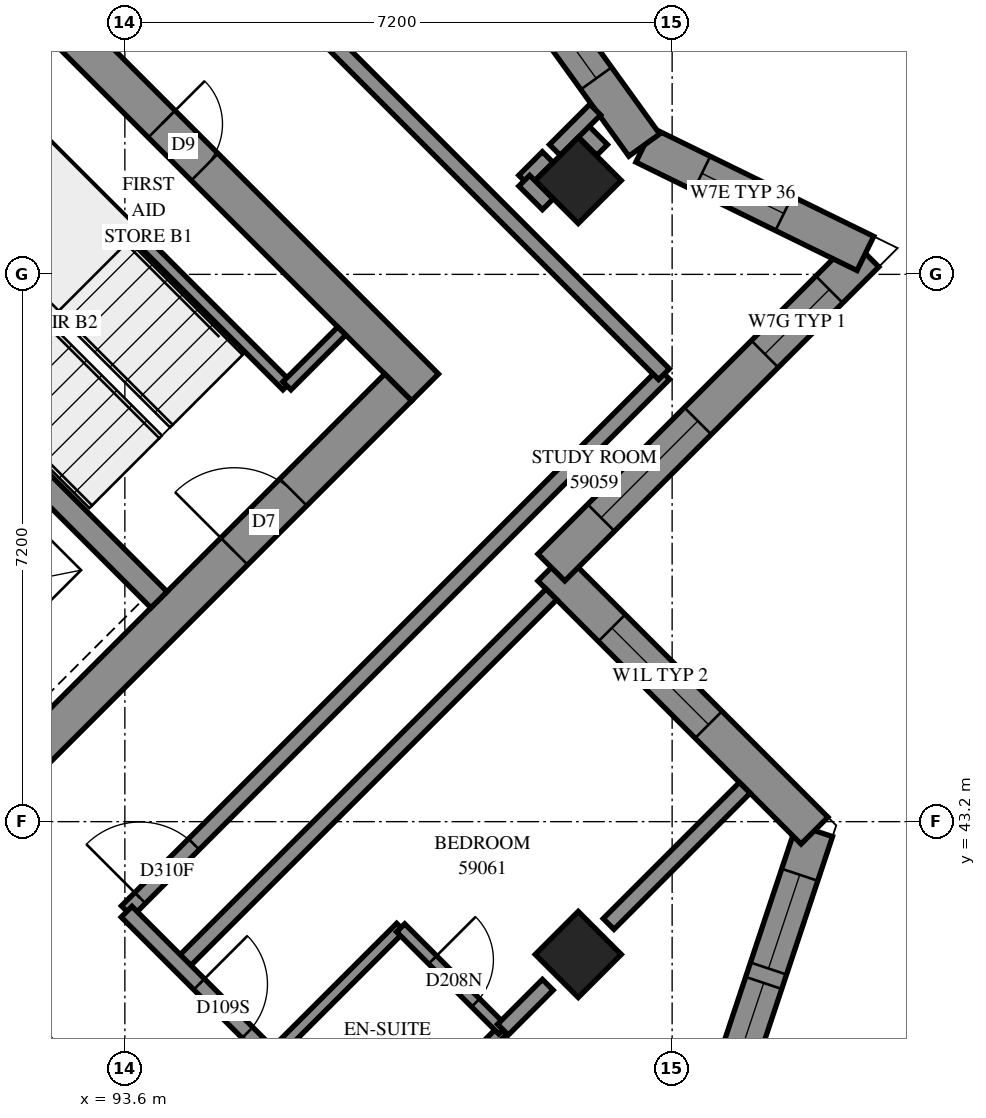
"""IFC4 building model, lengths in metres.
Left out: names, types, materials, properties, quantities, classifications, styles, units other than length and angle.
Written with IfcOpenShell. Run it as: python <this file> out.ifc"""

import sys

from ifc_helpers import new_model, si_unit, direction, frame, frame_2d, origin, origin_2d, place, context, subcontext, project, spatial, polyline, rectangle, outline, extrude, element, fill, save


model = new_model("IFC4")
c1 = context("Model", 3, precision=1e-05, world=origin(), true_north=direction((0.0, 1.0)))
c2 = subcontext(c1, "Body", "Model", "MODEL_VIEW")
j1 = project(units=[si_unit("LENGTHUNIT", "METRE"), si_unit("PLANEANGLEUNIT", "RADIAN")], contexts=[c1])
p1 = place(None, origin())
s1 = spatial("IfcSite", under=j1, at=p1, CompositionType="ELEMENT")
p2 = place(p1, origin())
s2 = spatial("IfcBuilding", under=s1, at=p2, CompositionType="ELEMENT")
p3 = place(p2, frame((0.0, 0.0, 216.8)))
s3 = spatial("IfcBuildingStorey", under=s2, at=p3, CompositionType="ELEMENT", Elevation=216.8)
for number, where, z_axis, x_axis in (
    (1, (99.565, 51.635, 0.0), (0.0, 0.0, 1.0), (0.707, -0.707, 0.0)),
    (2, (99.565, 41.453, 0.0), (0.0, 0.0, 1.0), (0.707, -0.707, 0.0)),
):
    element("IfcColumn", number, at=place(p3, frame(where, z_axis=z_axis, x_axis=x_axis)), inside=s3, PredefinedType="COLUMN", context=c2, shape_type="SweptSolid", body=[
        extrude(rectangle(XDim=0.8, YDim=0.8, at=origin_2d()), origin(), (0.0, 0.0, 1.0), 3.1),
    ])
p4 = place(p3, frame((86.66, 59.802, -0.3), z_axis=(0.0, 0.0, 1.0), x_axis=(0.7071067812, -0.7071067812, 0.0)))
e3 = element("IfcWall", 3, at=p4, inside=s3, PredefinedType="SHEAR", context=c2, shape_type="SweptSolid", body=[
    extrude(rectangle(XDim=15.4, YDim=0.5, at=frame_2d((7.7, 0.0))), origin(), (0.0, 0.0, 1.0), 2.7),
])
p5 = place(p4, frame((10.5, 0.0, 0.3)))
e4 = element("IfcOpeningElement", 4, at=p5, cuts=e3, PredefinedType="OPENING", context=c2, shape_type="SweptSolid", body=[
    extrude(rectangle(XDim=0.8, YDim=2.1, at=frame_2d((0.4, 1.05))), frame((0.0, 0.26, 0.0), z_axis=(0.0, -1.0, 0.0), x_axis=(1.0, 0.0, 0.0)), (0.0, 0.0, 1.0), 0.52),
])
p6 = place(p3, frame((87.013, 38.731, -0.3), z_axis=(0.0, 0.0, 1.0), x_axis=(0.7071067812, 0.7071067812, 0.0)))
e5 = element("IfcWall", 5, at=p6, inside=s3, PredefinedType="SHEAR", context=c2, shape_type="SweptSolid", body=[
    extrude(rectangle(XDim=14.4, YDim=0.5, at=frame_2d((7.2, 0.0))), origin(), (0.0, 0.0, 1.0), 2.7),
])
p7 = place(p6, frame((4.55, 0.0, 0.3)))
e6 = element("IfcOpeningElement", 6, at=p7, cuts=e5, PredefinedType="OPENING", context=c2, shape_type="SweptSolid", body=[
    extrude(rectangle(XDim=1.1, YDim=2.1, at=frame_2d((0.55, 1.05))), frame((0.0, 0.26, 0.0), z_axis=(0.0, -1.0, 0.0), x_axis=(1.0, 0.0, 0.0)), (0.0, 0.0, 1.0), 0.52),
])
p8 = place(p6, frame((11.35, 0.0, 0.3)))
e7 = element("IfcOpeningElement", 7, at=p8, cuts=e5, PredefinedType="OPENING", context=c2, shape_type="SweptSolid", body=[
    extrude(rectangle(XDim=1.1, YDim=2.1, at=frame_2d((0.55, 1.05))), frame((0.0, 0.26, 0.0), z_axis=(0.0, -1.0, 0.0), x_axis=(1.0, 0.0, 0.0)), (0.0, 0.0, 1.0), 0.52),
])
p9 = place(p3, frame((88.958, 51.211, 0.0), z_axis=(0.0, 0.0, 1.0), x_axis=(0.7070998367, -0.7071137256, 0.0)))
e8 = element("IfcWall", 8, at=p9, inside=s3, PredefinedType="SOLIDWALL", context=c2, shape_type="SweptSolid", body=[
    extrude(rectangle(XDim=7.2, YDim=0.3, at=frame_2d((3.6, 0.0))), origin(), (0.0, 0.0, 1.0), 3.1),
])
p10 = place(p3, frame((101.062, 38.252, 0.0), z_axis=(0.0, 0.0, 1.0), x_axis=(0.3162395484, 0.9486793705, 0.0)))
e9 = element("IfcWall", 9, at=p10, inside=s3, PredefinedType="SOLIDWALL", context=c2, shape_type="SweptSolid", body=[
    extrude(outline(polyline([(-0.12, -0.25), (5.247, -0.25), (4.938, 0.25), (0.12, 0.25), (-0.12, -0.25)])), origin(), (0.0, 0.0, 1.0), 3.1),
])
p11 = place(p10, frame((1.68, 0.0, 0.45)))
e10 = element("IfcOpeningElement", 10, at=p11, cuts=e9, PredefinedType="OPENING", context=c2, shape_type="SweptSolid", body=[
    extrude(rectangle(XDim=1.3, YDim=2.5, at=frame_2d((0.65, 1.25))), frame((0.0, 0.26, 0.0), z_axis=(0.0, -1.0, 0.0), x_axis=(1.0, 0.0, 0.0)), (0.0, 0.0, 1.0), 0.52),
])
p12 = place(p10, frame((3.18, 0.0, 0.45)))
e11 = element("IfcOpeningElement", 11, at=p12, cuts=e9, PredefinedType="OPENING", context=c2, shape_type="SweptSolid", body=[
    extrude(rectangle(XDim=1.3, YDim=2.5, at=frame_2d((0.65, 1.25))), frame((0.0, 0.26, 0.0), z_axis=(0.0, -1.0, 0.0), x_axis=(1.0, 0.0, 0.0)), (0.0, 0.0, 1.0), 0.52),
])
p13 = place(p3, frame((102.673, 43.083, 0.0), z_axis=(0.0, 0.0, 1.0), x_axis=(-0.7071067812, 0.7071067812, 0.0)))
e12 = element("IfcWall", 12, at=p13, inside=s3, PredefinedType="SOLIDWALL", context=c2, shape_type="SweptSolid", body=[
    extrude(outline(polyline([(-0.154, -0.25), (4.646, -0.25), (5.146, 0.25), (0.154, 0.25), (-0.154, -0.25)])), origin(), (0.0, 0.0, 1.0), 3.1),
])
p14 = place(p13, frame((1.97, 0.0, 0.6)))
e13 = element("IfcOpeningElement", 13, at=p14, cuts=e12, PredefinedType="OPENING", context=c2, shape_type="SweptSolid", body=[
    extrude(rectangle(XDim=1.8, YDim=1.9, at=frame_2d((0.9, 0.95))), frame((0.0, 0.26, 0.0), z_axis=(0.0, -1.0, 0.0), x_axis=(1.0, 0.0, 0.0)), (0.0, 0.0, 1.0), 0.52),
])
p15 = place(p3, frame((99.211, 46.544, 0.0), z_axis=(0.0, 0.0, 1.0), x_axis=(0.7071067812, 0.7071067812, 0.0)))
e14 = element("IfcWall", 14, at=p15, inside=s3, PredefinedType="SOLIDWALL", context=c2, shape_type="SweptSolid", body=[
    extrude(outline(polyline([(0.25, -0.25), (6.192, -0.25), (5.492, 0.25), (-0.25, 0.25), (0.25, -0.25)])), origin(), (0.0, 0.0, 1.0), 3.1),
])
p16 = place(p15, frame((0.925, 0.0, 0.6)))
e15 = element("IfcOpeningElement", 15, at=p16, cuts=e14, PredefinedType="OPENING", context=c2, shape_type="SweptSolid", body=[
    extrude(rectangle(XDim=1.8, YDim=1.9, at=frame_2d((0.9, 0.95))), frame((0.0, 0.26, 0.0), z_axis=(0.0, -1.0, 0.0), x_axis=(1.0, 0.0, 0.0)), (0.0, 0.0, 1.0), 0.52),
])
p17 = place(p15, frame((3.971, 0.0, 0.6)))
e16 = element("IfcOpeningElement", 16, at=p17, cuts=e14, PredefinedType="OPENING", context=c2, shape_type="SweptSolid", body=[
    extrude(rectangle(XDim=1.2, YDim=1.9, at=frame_2d((0.6, 0.95))), frame((0.0, 0.26, 0.0), z_axis=(0.0, -1.0, 0.0), x_axis=(1.0, 0.0, 0.0)), (0.0, 0.0, 1.0), 0.52),
])
p18 = place(p3, frame((103.342, 50.675, 0.0), z_axis=(0.0, 0.0, 1.0), x_axis=(-0.8979728607, 0.4400508396, 0.0)))
e17 = element("IfcWall", 17, at=p18, inside=s3, PredefinedType="SOLIDWALL", context=c2, shape_type="SweptSolid", body=[
    extrude(outline(polyline([(-0.35, -0.25), (3.177, -0.25), (3.302, 0.25), (0.35, 0.25), (-0.35, -0.25)])), origin(), (0.0, 0.0, 1.0), 3.1),
])
p19 = place(p18, frame((1.195, 0.0, 0.45)))
e18 = element("IfcOpeningElement", 18, at=p19, cuts=e17, PredefinedType="OPENING", context=c2, shape_type="SweptSolid", body=[
    extrude(rectangle(XDim=1.2, YDim=2.5, at=frame_2d((0.6, 1.25))), frame((0.0, 0.26, 0.0), z_axis=(0.0, -1.0, 0.0), x_axis=(1.0, 0.0, 0.0)), (0.0, 0.0, 1.0), 0.52),
])
p20 = place(p3, frame((100.433, 52.101, 0.0), z_axis=(0.0, 0.0, 1.0), x_axis=(-0.5845942373, 0.8113258148, 0.0)))
e19 = element("IfcWall", 19, at=p20, inside=s3, PredefinedType="SOLIDWALL", context=c2, shape_type="SweptSolid", body=[
    extrude(outline(polyline([(0.063, -0.25), (3.443, -0.25), (3.362, 0.25), (-0.063, 0.25), (0.063, -0.25)])), origin(), (0.0, 0.0, 1.0), 3.1),
])
p21 = place(p20, frame((1.081, 0.0, 0.45)))
e20 = element("IfcOpeningElement", 20, at=p21, cuts=e19, PredefinedType="OPENING", context=c2, shape_type="SweptSolid", body=[
    extrude(rectangle(XDim=1.2, YDim=2.5, at=frame_2d((0.6, 1.25))), frame((0.0, 0.26, 0.0), z_axis=(0.0, -1.0, 0.0), x_axis=(1.0, 0.0, 0.0)), (0.0, 0.0, 1.0), 0.52),
])
p22 = place(p3, frame((91.313, 53.354, 0.0), z_axis=(0.0, 0.0, 1.0), x_axis=(0.7071147811, -0.7070987812, 0.0)))
e21 = element("IfcWall", 21, at=p22, inside=s3, PredefinedType="PARTITIONING", context=c2, shape_type="SweptSolid", body=[
    extrude(rectangle(XDim=6.25, YDim=0.15, at=frame_2d((3.125, 0.0))), origin(), (0.0, 0.0, 1.0), 3.1),
])
p23 = place(p3, frame((95.732, 48.934, 0.0), z_axis=(0.0, 0.0, 1.0), x_axis=(0.7071067812, 0.7071067812, 0.0)))
e22 = element("IfcWall", 22, at=p23, inside=s3, PredefinedType="PARTITIONING", context=c2, shape_type="SweptSolid", body=[
    extrude(rectangle(XDim=1.02, YDim=0.15, at=frame_2d((0.51, 0.0))), origin(), (0.0, 0.0, 1.0), 3.1),
])
p24 = place(p3, frame((93.625, 42.021, 0.0), z_axis=(0.0, 0.0, 1.0), x_axis=(0.7071067812, 0.7071067812, 0.0)))
e23 = element("IfcWall", 23, at=p24, inside=s3, PredefinedType="PARTITIONING", context=c2, shape_type="SweptSolid", body=[
    extrude(rectangle(XDim=9.998, YDim=0.2, at=frame_2d((4.999, 0.0))), origin(), (0.0, 0.0, 1.0), 3.1),
])
p25 = place(p24, frame((0.248, 0.0, 0.0)))
e24 = element("IfcOpeningElement", 24, at=p25, cuts=e23, PredefinedType="OPENING", context=c2, shape_type="SweptSolid", body=[
    extrude(rectangle(XDim=1.0, YDim=2.1, at=frame_2d((0.5, 1.05))), frame((0.0, 0.11, 0.0), z_axis=(0.0, -1.0, 0.0), x_axis=(1.0, 0.0, 0.0)), (0.0, 0.0, 1.0), 0.22),
])
p26 = place(p3, frame((94.331, 41.313, 0.0), z_axis=(0.0, 0.0, 1.0), x_axis=(0.7072516979, 0.7069618347, 0.0)))
e25 = element("IfcWall", 25, at=p26, inside=s3, PredefinedType="PARTITIONING", context=c2, shape_type="SweptSolid", body=[
    extrude(rectangle(XDim=6.9, YDim=0.2, at=frame_2d((3.45, 0.0))), origin(), (0.0, 0.0, 1.0), 3.1),
])
p27 = place(p3, frame((96.309, 53.471, 0.0), z_axis=(0.0, 0.0, 1.0), x_axis=(0.7071067812, -0.7071067812, 0.0)))
e26 = element("IfcWall", 26, at=p27, inside=s3, PredefinedType="PARTITIONING", context=c2, shape_type="SweptSolid", body=[
    extrude(rectangle(XDim=6.2, YDim=0.2, at=frame_2d((3.1, 0.0))), origin(), (0.0, 0.0, 1.0), 3.1),
])
p28 = place(p3, frame((93.623, 42.015, 0.0), z_axis=(0.0, 0.0, 1.0), x_axis=(0.7071067812, -0.7071067812, 0.0)))
e27 = element("IfcWall", 27, at=p28, inside=s3, PredefinedType="PARTITIONING", context=c2, shape_type="SweptSolid", body=[
    extrude(rectangle(XDim=4.599, YDim=0.2, at=frame_2d((2.3, 0.0))), origin(), (0.0, 0.0, 1.0), 3.1),
])
p29 = place(p28, frame((1.349, 0.0, 0.0)))
e28 = element("IfcOpeningElement", 28, at=p29, cuts=e27, PredefinedType="OPENING", context=c2, shape_type="SweptSolid", body=[
    extrude(rectangle(XDim=0.9, YDim=2.1, at=frame_2d((0.45, 1.05))), frame((0.0, 0.11, 0.0), z_axis=(0.0, -1.0, 0.0), x_axis=(1.0, 0.0, 0.0)), (0.0, 0.0, 1.0), 0.22),
])
p30 = place(p3, frame((92.216, 40.608, 0.0), z_axis=(0.0, 0.0, 1.0), x_axis=(0.7071067812, -0.7071067812, 0.0)))
e29 = element("IfcWall", 29, at=p30, inside=s3, PredefinedType="PARTITIONING", context=c2, shape_type="SweptSolid", body=[
    extrude(rectangle(XDim=4.599, YDim=0.2, at=frame_2d((2.3, 0.0))), origin(), (0.0, 0.0, 1.0), 3.1),
])
p31 = place(p30, frame((3.189, 0.0, 0.0)))
e30 = element("IfcOpeningElement", 30, at=p31, cuts=e29, PredefinedType="OPENING", context=c2, shape_type="SweptSolid", body=[
    extrude(rectangle(XDim=0.9, YDim=2.1, at=frame_2d((0.45, 1.05))), frame((0.0, 0.11, 0.0), z_axis=(0.0, -1.0, 0.0), x_axis=(1.0, 0.0, 0.0)), (0.0, 0.0, 1.0), 0.22),
])
p32 = place(p3, frame((99.964, 41.854, 0.0), z_axis=(0.0, 0.0, 1.0), x_axis=(0.7071265121, 0.7070870497, 0.0)))
e31 = element("IfcWall", 31, at=p32, inside=s3, PredefinedType="PARTITIONING", context=c2, shape_type="SweptSolid", body=[
    extrude(rectangle(XDim=2.534, YDim=0.2, at=frame_2d((1.267, 0.0))), origin(), (0.0, 0.0, 1.0), 3.1),
])
p33 = place(p3, frame((96.879, 38.764, 0.0), z_axis=(0.0, 0.0, 1.0), x_axis=(0.706689978, 0.7075233388, 0.0)))
e32 = element("IfcWall", 32, at=p33, inside=s3, PredefinedType="PARTITIONING", context=c2, shape_type="SweptSolid", body=[
    extrude(rectangle(XDim=2.4, YDim=0.15, at=frame_2d((1.2, 0.0))), origin(), (0.0, 0.0, 1.0), 2.6),
])
p34 = place(p3, frame((95.531, 40.113, 0.0), z_axis=(0.0, 0.0, 1.0), x_axis=(0.7075233388, 0.706689978, 0.0)))
e33 = element("IfcWall", 33, at=p34, inside=s3, PredefinedType="PARTITIONING", context=c2, shape_type="SweptSolid", body=[
    extrude(rectangle(XDim=2.4, YDim=0.15, at=frame_2d((1.2, 0.0))), origin(), (0.0, 0.0, 1.0), 3.1),
])
p35 = place(p3, frame((97.229, 41.803, 0.0), z_axis=(0.0, 0.0, 1.0), x_axis=(0.7071067812, -0.7071067812, 0.0)))
e34 = element("IfcWall", 34, at=p35, inside=s3, PredefinedType="PARTITIONING", context=c2, shape_type="SweptSolid", body=[
    extrude(rectangle(XDim=1.898, YDim=0.15, at=frame_2d((0.949, 0.0))), origin(), (0.0, 0.0, 1.0), 3.1),
])
p36 = place(p35, frame((0.594, 0.0, 0.0)))
e35 = element("IfcOpeningElement", 35, at=p36, cuts=e34, PredefinedType="OPENING", context=c2, shape_type="SweptSolid", body=[
    extrude(rectangle(XDim=0.8, YDim=2.1, at=frame_2d((0.4, 1.05))), frame((0.0, 0.085, 0.0), z_axis=(0.0, -1.0, 0.0), x_axis=(1.0, 0.0, 0.0)), (0.0, 0.0, 1.0), 0.17),
])
p37 = place(p3, frame((98.574, 40.464, 0.0), z_axis=(0.0, 0.0, 1.0), x_axis=(0.7071067812, 0.7071067812, 0.0)))
e36 = element("IfcWall", 36, at=p37, inside=s3, PredefinedType="PARTITIONING", context=c2, shape_type="SweptSolid", body=[
    extrude(rectangle(XDim=0.834, YDim=0.2, at=frame_2d((0.417, 0.0))), origin(), (0.0, 0.0, 1.0), 2.6),
])
for number, where, z_axis, x_axis in (
    (37, (98.853, 51.633, 0.0), (0.0, 0.0, 1.0), (0.707, 0.707, 0.0)),
    (38, (98.854, 51.632, 0.0), (0.0, 0.0, 1.0), (0.707, -0.707, 0.0)),
    (39, (99.568, 52.346, 0.0), (0.0, 0.0, 1.0), (0.707, -0.707, 0.0)),
):
    element("IfcWall", number, at=place(p3, frame(where, z_axis=z_axis, x_axis=x_axis)), inside=s3, PredefinedType="PARTITIONING", context=c2, shape_type="SweptSolid", body=[
        extrude(rectangle(XDim=0.438, YDim=0.2, at=frame_2d((0.219, 0.0))), origin(), (0.0, 0.0, 1.0), 3.1),
    ])
p38 = place(p3, frame((99.257, 52.037, 0.0), z_axis=(0.0, 0.0, 1.0), x_axis=(0.7071067812, 0.7071067812, 0.0)))
e40 = element("IfcWall", 40, at=p38, inside=s3, PredefinedType="PARTITIONING", context=c2, shape_type="SweptSolid", body=[
    extrude(rectangle(XDim=0.751, YDim=0.2, at=frame_2d((0.376, 0.0))), origin(), (0.0, 0.0, 1.0), 3.1),
])
p39 = place(p11, origin())
e41 = element("IfcWindow", 41, at=p39, inside=s3, PartitioningType="SINGLE_PANEL", PredefinedType="WINDOW", context=c2, shape_type="SweptSolid", body=[
    extrude(rectangle(XDim=1.3, YDim=2.5, at=frame_2d((0.65, 1.25))), frame((0.0, 0.18, 0.0), z_axis=(0.0, -1.0, 0.0), x_axis=(1.0, 0.0, 0.0)), (0.0, 0.0, 1.0), 0.06),
])
fill(e10, e41)
p40 = place(p12, origin())
e42 = element("IfcWindow", 42, at=p40, inside=s3, PartitioningType="SINGLE_PANEL", PredefinedType="WINDOW", context=c2, shape_type="SweptSolid", body=[
    extrude(rectangle(XDim=1.3, YDim=2.5, at=frame_2d((0.65, 1.25))), frame((0.0, 0.18, 0.0), z_axis=(0.0, -1.0, 0.0), x_axis=(1.0, 0.0, 0.0)), (0.0, 0.0, 1.0), 0.06),
])
fill(e11, e42)
p41 = place(p14, origin())
e43 = element("IfcWindow", 43, at=p41, inside=s3, PartitioningType="SINGLE_PANEL", PredefinedType="WINDOW", context=c2, shape_type="SweptSolid", body=[
    extrude(rectangle(XDim=1.8, YDim=1.9, at=frame_2d((0.9, 0.95))), frame((0.0, 0.18, 0.0), z_axis=(0.0, -1.0, 0.0), x_axis=(1.0, 0.0, 0.0)), (0.0, 0.0, 1.0), 0.06),
])
fill(e13, e43)
p42 = place(p16, origin())
e44 = element("IfcWindow", 44, at=p42, inside=s3, PartitioningType="SINGLE_PANEL", PredefinedType="WINDOW", context=c2, shape_type="SweptSolid", body=[
    extrude(rectangle(XDim=1.8, YDim=1.9, at=frame_2d((0.9, 0.95))), frame((0.0, 0.18, 0.0), z_axis=(0.0, -1.0, 0.0), x_axis=(1.0, 0.0, 0.0)), (0.0, 0.0, 1.0), 0.06),
])
fill(e15, e44)
p43 = place(p17, origin())
e45 = element("IfcWindow", 45, at=p43, inside=s3, PartitioningType="SINGLE_PANEL", PredefinedType="WINDOW", context=c2, shape_type="SweptSolid", body=[
    extrude(rectangle(XDim=1.2, YDim=1.9, at=frame_2d((0.6, 0.95))), frame((0.0, 0.18, 0.0), z_axis=(0.0, -1.0, 0.0), x_axis=(1.0, 0.0, 0.0)), (0.0, 0.0, 1.0), 0.06),
])
fill(e16, e45)
p44 = place(p19, origin())
e46 = element("IfcWindow", 46, at=p44, inside=s3, PartitioningType="SINGLE_PANEL", PredefinedType="WINDOW", context=c2, shape_type="SweptSolid", body=[
    extrude(rectangle(XDim=1.2, YDim=2.5, at=frame_2d((0.6, 1.25))), frame((0.0, 0.18, 0.0), z_axis=(0.0, -1.0, 0.0), x_axis=(1.0, 0.0, 0.0)), (0.0, 0.0, 1.0), 0.06),
])
fill(e18, e46)
p45 = place(p21, origin())
e47 = element("IfcWindow", 47, at=p45, inside=s3, PartitioningType="SINGLE_PANEL", PredefinedType="WINDOW", context=c2, shape_type="SweptSolid", body=[
    extrude(rectangle(XDim=1.2, YDim=2.5, at=frame_2d((0.6, 1.25))), frame((0.0, 0.18, 0.0), z_axis=(0.0, -1.0, 0.0), x_axis=(1.0, 0.0, 0.0)), (0.0, 0.0, 1.0), 0.06),
])
fill(e20, e47)
p46 = place(p5, origin())
e48 = element("IfcDoor", 48, at=p46, inside=s3, OperationType="SINGLE_SWING_RIGHT", PredefinedType="DOOR", context=c2, shape_type="SweptSolid", body=[
    extrude(rectangle(XDim=0.8, YDim=2.1, at=frame_2d((0.4, 1.05))), frame((0.0, 0.025, 0.0), z_axis=(0.0, -1.0, 0.0), x_axis=(1.0, 0.0, 0.0)), (0.0, 0.0, 1.0), 0.05),
])
fill(e4, e48)
p47 = place(p8, origin())
e49 = element("IfcDoor", 49, at=p47, inside=s3, OperationType="SINGLE_SWING_RIGHT", PredefinedType="DOOR", context=c2, shape_type="SweptSolid", body=[
    extrude(rectangle(XDim=1.1, YDim=2.1, at=frame_2d((0.55, 1.05))), frame((0.0, 0.025, 0.0), z_axis=(0.0, -1.0, 0.0), x_axis=(1.0, 0.0, 0.0)), (0.0, 0.0, 1.0), 0.05),
])
fill(e7, e49)
p48 = place(p25, origin())
e50 = element("IfcDoor", 50, at=p48, inside=s3, OperationType="SINGLE_SWING_LEFT", PredefinedType="DOOR", context=c2, shape_type="SweptSolid", body=[
    extrude(rectangle(XDim=1.0, YDim=2.1, at=frame_2d((0.5, 1.05))), frame((0.0, 0.025, 0.0), z_axis=(0.0, -1.0, 0.0), x_axis=(1.0, 0.0, 0.0)), (0.0, 0.0, 1.0), 0.05),
])
fill(e24, e50)
p49 = place(p29, origin())
e51 = element("IfcDoor", 51, at=p49, inside=s3, OperationType="SINGLE_SWING_RIGHT", PredefinedType="DOOR", context=c2, shape_type="SweptSolid", body=[
    extrude(rectangle(XDim=0.9, YDim=2.1, at=frame_2d((0.45, 1.05))), frame((0.0, 0.025, 0.0), z_axis=(0.0, -1.0, 0.0), x_axis=(1.0, 0.0, 0.0)), (0.0, 0.0, 1.0), 0.05),
])
fill(e28, e51)
p50 = place(p36, origin())
e52 = element("IfcDoor", 52, at=p50, inside=s3, OperationType="SINGLE_SWING_RIGHT", PredefinedType="DOOR", context=c2, shape_type="SweptSolid", body=[
    extrude(rectangle(XDim=0.8, YDim=2.1, at=frame_2d((0.4, 1.05))), frame((0.0, 0.025, 0.0), z_axis=(0.0, -1.0, 0.0), x_axis=(1.0, 0.0, 0.0)), (0.0, 0.0, 1.0), 0.05),
])
fill(e35, e52)
save(model, sys.argv[1])
